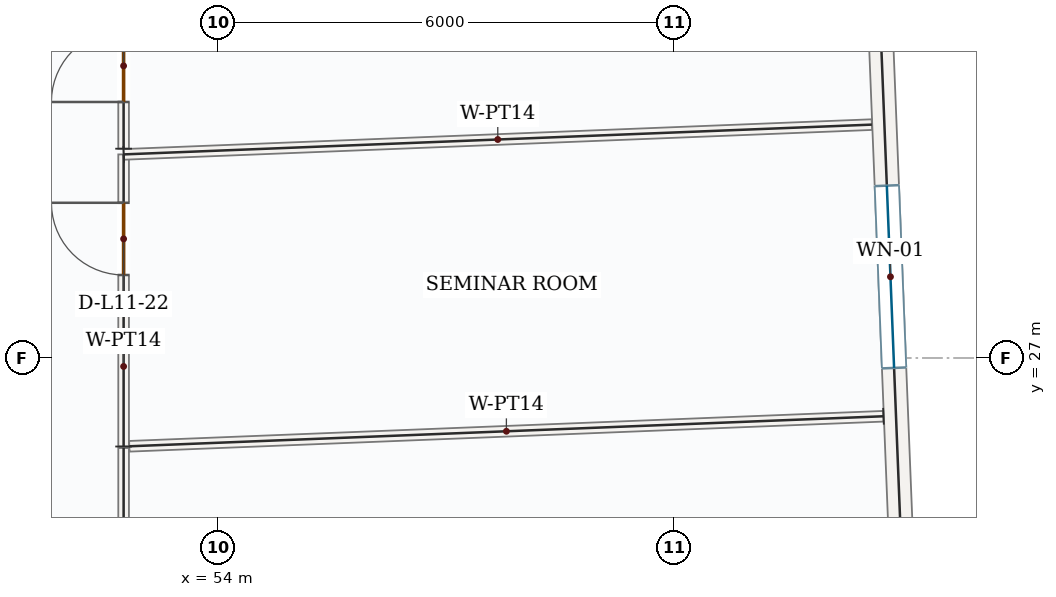
"""IFC4 building model, lengths in metres.
Left out: names, types, materials, properties, quantities, classifications, styles, units other than length and angle.
Written with IfcOpenShell. Run it as: python <this file> out.ifc"""

import sys

from ifc_helpers import new_model, si_unit, direction, frame, frame_2d, origin, place, context, subcontext, project, spatial, rectangle, extrude, source, transform, mapped, element, fill, save


model = new_model("IFC4")
c1 = context("Model", 3, precision=1e-05, world=origin(), true_north=direction((0.0, 1.0)))
c2 = subcontext(c1, "Body", "Model", "MODEL_VIEW")
j1 = project(units=[si_unit("LENGTHUNIT", "METRE"), si_unit("PLANEANGLEUNIT", "RADIAN")], contexts=[c1])
p1 = place(None, origin())
s1 = spatial("IfcSite", under=j1, at=p1, CompositionType="ELEMENT")
p2 = place(p1, origin())
s2 = spatial("IfcBuilding", under=s1, at=p2, CompositionType="ELEMENT")
p3 = place(p2, frame((0.0, 0.0, 54.3)))
s3 = spatial("IfcBuildingStorey", under=s2, at=p3, CompositionType="ELEMENT", Elevation=54.3)
p4 = place(p3, frame((62.641, 33.025, 0.0), z_axis=(0.0, 0.0, 1.0), x_axis=(0.03977146366, -0.999208802342, 0.0)))
e1 = element("IfcWall", 1, at=p4, inside=s3, PredefinedType="SOLIDWALL", context=c2, shape_type="SweptSolid", body=[
    extrude(rectangle(XDim=9.92, YDim=0.32, at=frame_2d((4.96, 0.0))), origin(), (0.0, 0.0, 1.0), 3.95),
])
p5 = place(p4, frame((3.76, 0.0, 0.85)))
e2 = element("IfcOpeningElement", 2, at=p5, cuts=e1, PredefinedType="OPENING", context=c2, shape_type="SweptSolid", body=[
    extrude(rectangle(XDim=2.4, YDim=1.8, at=frame_2d((1.2, 0.9))), frame((0.0, 0.17, 0.0), z_axis=(0.0, -1.0, 0.0), x_axis=(1.0, 0.0, 0.0)), (0.0, 0.0, 1.0), 0.34),
])
p6 = place(p3, frame((52.75, 25.835, 0.0), z_axis=(0.0, 0.0, 1.0), x_axis=(0.0, 1.0, 0.0)))
e3 = element("IfcWall", 3, at=p6, inside=s3, PredefinedType="PARTITIONING", context=c2, shape_type="SweptSolid", body=[
    extrude(rectangle(XDim=3.843, YDim=0.14, at=frame_2d((1.921, 0.0))), origin(), (0.0, 0.0, 1.0), 3.95),
])
p7 = place(p6, frame((2.257, 0.0, 0.0)))
e4 = element("IfcOpeningElement", 4, at=p7, cuts=e3, PredefinedType="OPENING", context=c2, shape_type="SweptSolid", body=[
    extrude(rectangle(XDim=0.95, YDim=2.15, at=frame_2d((0.475, 1.075))), frame((0.0, 0.08, 0.0), z_axis=(0.0, -1.0, 0.0), x_axis=(1.0, 0.0, 0.0)), (0.0, 0.0, 1.0), 0.16),
])
m1 = source(origin(), c2, "Body", "SweptSolid", [
    extrude(rectangle(XDim=9.851, YDim=0.14, at=frame_2d((4.925, 0.0))), origin(), (0.0, 0.0, 1.0), 3.95),
])
p8 = place(p3, frame((52.751, 29.678, 0.0), z_axis=(0.0, 0.0, 1.0), x_axis=(0.999208542072, 0.039778002084, 0.0)))
e5 = element("IfcWall", 5, at=p8, inside=s3, PredefinedType="PARTITIONING", context=c2, shape_type="MappedRepresentation", body=[
    mapped(m1, transform((0.0, 0.0, 0.0), x_axis=(1.0, 0.0, 0.0), y_axis=(0.0, 1.0, 0.0), z_axis=(0.0, 0.0, 1.0), scale=1.0)),
])
m2 = source(origin(), c2, "Body", "SweptSolid", [
    extrude(rectangle(XDim=9.929, YDim=0.14, at=frame_2d((4.965, 0.0))), origin(), (0.0, 0.0, 1.0), 3.95),
])
p9 = place(p3, frame((62.747, 26.233, 0.0), z_axis=(0.0, 0.0, 1.0), x_axis=(-0.999208364847, -0.039782453661, 0.0)))
e6 = element("IfcWall", 6, at=p9, inside=s3, PredefinedType="PARTITIONING", context=c2, shape_type="MappedRepresentation", body=[
    mapped(m2, transform((0.0, 0.0, 0.0), x_axis=(1.0, 0.0, 0.0), y_axis=(0.0, 1.0, 0.0), z_axis=(0.0, 0.0, 1.0), scale=1.0)),
])
p10 = place(p3, frame((52.75, 20.575, 0.0), z_axis=(0.0, 0.0, 1.0), x_axis=(0.0, 1.0, 0.0)))
e7 = element("IfcWall", 7, at=p10, inside=s3, PredefinedType="PARTITIONING", context=c2, shape_type="SweptSolid", body=[
    extrude(rectangle(XDim=5.24, YDim=0.14, at=frame_2d((2.62, 0.0))), origin(), (0.0, 0.0, 1.0), 3.95),
])
p11 = place(p10, frame((2.789, 0.0, 0.0)))
e8 = element("IfcOpeningElement", 8, at=p11, cuts=e7, PredefinedType="OPENING", context=c2, shape_type="SweptSolid", body=[
    extrude(rectangle(XDim=0.95, YDim=2.15, at=frame_2d((0.475, 1.075))), frame((0.0, 0.08, 0.0), z_axis=(0.0, -1.0, 0.0), x_axis=(1.0, 0.0, 0.0)), (0.0, 0.0, 1.0), 0.16),
])
p12 = place(p3, frame((52.75, 29.753, 0.0), z_axis=(0.0, 0.0, 1.0), x_axis=(-0.000326030238, 0.999999946852, 0.0)))
e9 = element("IfcWall", 9, at=p12, inside=s3, PredefinedType="PARTITIONING", context=c2, shape_type="SweptSolid", body=[
    extrude(rectangle(XDim=3.744, YDim=0.14, at=frame_2d((1.872, 0.0))), origin(), (0.0, 0.0, 1.0), 3.95),
])
p13 = place(p12, frame((0.615, 0.0, 0.0)))
e10 = element("IfcOpeningElement", 10, at=p13, cuts=e9, PredefinedType="OPENING", context=c2, shape_type="SweptSolid", body=[
    extrude(rectangle(XDim=0.95, YDim=2.15, at=frame_2d((0.475, 1.075))), frame((0.0, 0.08, 0.0), z_axis=(0.0, -1.0, 0.0), x_axis=(1.0, 0.0, 0.0)), (0.0, 0.0, 1.0), 0.16),
])
m3 = source(origin(), c2, "Body", "SweptSolid", [
    extrude(rectangle(XDim=2.4, YDim=1.8, at=frame_2d((1.2, 0.9))), frame((0.0, 0.03, 0.0), z_axis=(0.0, -1.0, 0.0), x_axis=(1.0, 0.0, 0.0)), (0.0, 0.0, 1.0), 0.06),
])
p14 = place(p5, origin())
e11 = element("IfcWindow", 11, at=p14, inside=s3, PartitioningType="DOUBLE_PANEL_VERTICAL", PredefinedType="WINDOW", context=c2, shape_type="MappedRepresentation", body=[
    mapped(m3, transform((0.0, 0.0, 0.0), x_axis=(1.0, 0.0, 0.0), y_axis=(0.0, 1.0, 0.0), z_axis=(0.0, 0.0, 1.0), scale=1.0)),
])
fill(e2, e11)
m4 = source(origin(), c2, "Body", "SweptSolid", [
    extrude(rectangle(XDim=0.95, YDim=2.15, at=frame_2d((0.475, 1.075))), frame((0.0, 0.025, 0.0), z_axis=(0.0, -1.0, 0.0), x_axis=(1.0, 0.0, 0.0)), (0.0, 0.0, 1.0), 0.05),
])
p15 = place(p7, origin())
e12 = element("IfcDoor", 12, at=p15, inside=s3, OperationType="SINGLE_SWING_RIGHT", PredefinedType="DOOR", context=c2, shape_type="MappedRepresentation", body=[
    mapped(m4, transform((0.0, 0.0, 0.0), x_axis=(1.0, 0.0, 0.0), y_axis=(0.0, 1.0, 0.0), z_axis=(0.0, 0.0, 1.0), scale=1.0)),
])
fill(e4, e12)
p16 = place(p13, origin())
e13 = element("IfcDoor", 13, at=p16, inside=s3, OperationType="SINGLE_SWING_LEFT", PredefinedType="DOOR", context=c2, shape_type="MappedRepresentation", body=[
    mapped(m4, transform((0.0, 0.0, 0.0), x_axis=(1.0, 0.0, 0.0), y_axis=(0.0, 1.0, 0.0), z_axis=(0.0, 0.0, 1.0), scale=1.0)),
])
fill(e10, e13)
save(model, sys.argv[1])
